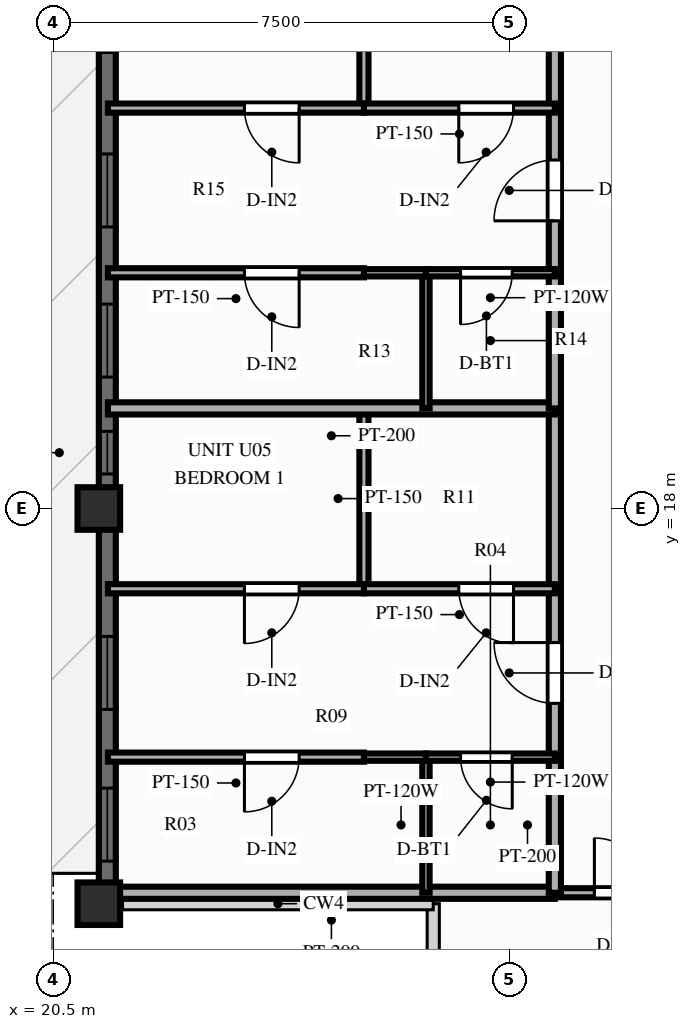
"""IFC4 building model, lengths in metres.
Left out: names, types, materials, properties, quantities, classifications, styles, units other than length and angle.
Written with IfcOpenShell. Run it as: python <this file> out.ifc"""

import sys

from ifc_helpers import new_model, si_unit, direction, frame, frame_2d, origin, origin_2d, place, context, subcontext, project, spatial, rectangle, extrude, source, transform, mapped, element, fill, save


model = new_model("IFC4")
c1 = context("Model", 3, precision=1e-05, world=origin(), true_north=direction((0.0, 1.0)))
c2 = subcontext(c1, "Body", "Model", "MODEL_VIEW")
j1 = project(units=[si_unit("LENGTHUNIT", "METRE"), si_unit("PLANEANGLEUNIT", "RADIAN")], contexts=[c1])
p1 = place(None, origin())
s1 = spatial("IfcSite", under=j1, at=p1, CompositionType="ELEMENT")
p2 = place(p1, origin())
s2 = spatial("IfcBuilding", under=s1, at=p2, CompositionType="ELEMENT")
p3 = place(p2, frame((0.0, 0.0, 236.1)))
s3 = spatial("IfcBuildingStorey", under=s2, at=p3, CompositionType="ELEMENT", Elevation=236.1)
m1 = source(origin(), c2, "Body", "SweptSolid", [
    extrude(rectangle(XDim=0.7, YDim=0.7, at=origin_2d()), origin(), (0.0, 0.0, 1.0), 3.9),
])
for number, where, z_axis, x_axis in (
    (1, (21.25, 18.0, 0.0), (0.0, 0.0, 1.0), (1.0, 0.0, 0.0)),
    (2, (21.25, 11.5, 0.0), (0.0, 0.0, 1.0), (1.0, 0.0, 0.0)),
):
    element("IfcColumn", number, at=place(p3, frame(where, z_axis=z_axis, x_axis=x_axis)), inside=s3, PredefinedType="COLUMN", context=c2, shape_type="MappedRepresentation", body=[
        mapped(m1, transform((0.0, 0.0, 0.0), scale=1.0)),
    ])
p4 = place(p3, frame((21.39, 11.5, 0.0), z_axis=(0.0, 0.0, 1.0), x_axis=(0.0, 1.0, 0.0)))
e3 = element("IfcWall", 3, at=p4, inside=s3, PredefinedType="SOLIDWALL", context=c2, shape_type="SweptSolid", body=[
    extrude(rectangle(XDim=31.0, YDim=0.28, at=frame_2d((15.5, 0.0))), origin(), (0.0, 0.0, 1.0), 2.44),
])
p5 = place(p4, frame((0.7, 0.0, 0.25)))
e4 = element("IfcOpeningElement", 4, at=p5, cuts=e3, PredefinedType="OPENING", context=c2, shape_type="SweptSolid", body=[
    extrude(rectangle(XDim=1.2, YDim=1.5, at=frame_2d((0.6, 0.75))), frame((0.0, 0.152, 0.0), z_axis=(0.0, -1.0, 0.0), x_axis=(1.0, 0.0, 0.0)), (0.0, 0.0, 1.0), 0.304),
])
p6 = place(p4, frame((3.195, 0.0, 0.25)))
e5 = element("IfcOpeningElement", 5, at=p6, cuts=e3, PredefinedType="OPENING", context=c2, shape_type="SweptSolid", body=[
    extrude(rectangle(XDim=1.2, YDim=1.5, at=frame_2d((0.6, 0.75))), frame((0.0, 0.152, 0.0), z_axis=(0.0, -1.0, 0.0), x_axis=(1.0, 0.0, 0.0)), (0.0, 0.0, 1.0), 0.304),
])
p7 = place(p4, frame((7.068, 0.0, 0.25)))
e6 = element("IfcOpeningElement", 6, at=p7, cuts=e3, PredefinedType="OPENING", context=c2, shape_type="SweptSolid", body=[
    extrude(rectangle(XDim=0.7, YDim=1.5, at=frame_2d((0.35, 0.75))), frame((0.0, 0.152, 0.0), z_axis=(0.0, -1.0, 0.0), x_axis=(1.0, 0.0, 0.0)), (0.0, 0.0, 1.0), 0.304),
])
p8 = place(p4, frame((8.662, 0.0, 0.25)))
e7 = element("IfcOpeningElement", 7, at=p8, cuts=e3, PredefinedType="OPENING", context=c2, shape_type="SweptSolid", body=[
    extrude(rectangle(XDim=1.2, YDim=1.5, at=frame_2d((0.6, 0.75))), frame((0.0, 0.152, 0.0), z_axis=(0.0, -1.0, 0.0), x_axis=(1.0, 0.0, 0.0)), (0.0, 0.0, 1.0), 0.304),
])
p9 = place(p4, frame((11.131, 0.0, 0.25)))
e8 = element("IfcOpeningElement", 8, at=p9, cuts=e3, PredefinedType="OPENING", context=c2, shape_type="SweptSolid", body=[
    extrude(rectangle(XDim=1.2, YDim=1.5, at=frame_2d((0.6, 0.75))), frame((0.0, 0.152, 0.0), z_axis=(0.0, -1.0, 0.0), x_axis=(1.0, 0.0, 0.0)), (0.0, 0.0, 1.0), 0.304),
])
p10 = place(p4, frame((13.999, 0.0, 0.25)))
e9 = element("IfcOpeningElement", 9, at=p10, cuts=e3, PredefinedType="OPENING", context=c2, shape_type="SweptSolid", body=[
    extrude(rectangle(XDim=1.2, YDim=1.5, at=frame_2d((0.6, 0.75))), frame((0.0, 0.152, 0.0), z_axis=(0.0, -1.0, 0.0), x_axis=(1.0, 0.0, 0.0)), (0.0, 0.0, 1.0), 0.304),
])
p11 = place(p4, frame((17.565, 0.0, 0.0)))
e10 = element("IfcOpeningElement", 10, at=p11, cuts=e3, PredefinedType="OPENING", context=c2, shape_type="SweptSolid", body=[
    extrude(rectangle(XDim=1.6, YDim=2.15, at=frame_2d((0.8, 1.075))), frame((0.0, 0.152, 0.0), z_axis=(0.0, -1.0, 0.0), x_axis=(1.0, 0.0, 0.0)), (0.0, 0.0, 1.0), 0.304),
])
p12 = place(p4, frame((21.441, 0.0, 0.25)))
e11 = element("IfcOpeningElement", 11, at=p12, cuts=e3, PredefinedType="OPENING", context=c2, shape_type="SweptSolid", body=[
    extrude(rectangle(XDim=1.2, YDim=1.5, at=frame_2d((0.6, 0.75))), frame((0.0, 0.152, 0.0), z_axis=(0.0, -1.0, 0.0), x_axis=(1.0, 0.0, 0.0)), (0.0, 0.0, 1.0), 0.304),
])
p13 = place(p4, frame((26.323, 0.0, 0.25)))
e12 = element("IfcOpeningElement", 12, at=p13, cuts=e3, PredefinedType="OPENING", context=c2, shape_type="SweptSolid", body=[
    extrude(rectangle(XDim=1.2, YDim=1.5, at=frame_2d((0.6, 0.75))), frame((0.0, 0.152, 0.0), z_axis=(0.0, -1.0, 0.0), x_axis=(1.0, 0.0, 0.0)), (0.0, 0.0, 1.0), 0.304),
])
p14 = place(p4, frame((28.818, 0.0, 0.25)))
e13 = element("IfcOpeningElement", 13, at=p14, cuts=e3, PredefinedType="OPENING", context=c2, shape_type="SweptSolid", body=[
    extrude(rectangle(XDim=1.2, YDim=1.5, at=frame_2d((0.6, 0.75))), frame((0.0, 0.152, 0.0), z_axis=(0.0, -1.0, 0.0), x_axis=(1.0, 0.0, 0.0)), (0.0, 0.0, 1.0), 0.304),
])
p15 = place(p3, frame((28.85, 11.68, 0.0), z_axis=(0.0, 0.0, 1.0), x_axis=(1.0, 0.0, 0.0)))
e14 = element("IfcWall", 14, at=p15, inside=s3, PredefinedType="PARTITIONING", context=c2, shape_type="SweptSolid", body=[
    extrude(rectangle(XDim=2.33, YDim=0.15, at=frame_2d((1.165, 0.0))), origin(), (0.0, 0.0, 1.0), 2.24),
])
p16 = place(p15, frame((0.55, 0.0, 0.0)))
e15 = element("IfcOpeningElement", 15, at=p16, cuts=e14, PredefinedType="OPENING", context=c2, shape_type="SweptSolid", body=[
    extrude(rectangle(XDim=0.9, YDim=2.1, at=frame_2d((0.45, 1.05))), frame((0.0, 0.087, 0.0), z_axis=(0.0, -1.0, 0.0), x_axis=(1.0, 0.0, 0.0)), (0.0, 0.0, 1.0), 0.174),
])
p17 = place(p3, frame((28.75, 11.68, 0.0), z_axis=(0.0, 0.0, 1.0), x_axis=(-1.0, 0.0, 0.0)))
e16 = element("IfcWall", 16, at=p17, inside=s3, PredefinedType="PARTITIONING", context=c2, shape_type="SweptSolid", body=[
    extrude(rectangle(XDim=7.35, YDim=0.2, at=frame_2d((3.675, 0.0))), origin(), (0.0, 0.0, 1.0), 2.24),
])
p18 = place(p3, frame((28.75, 11.68, 0.0), z_axis=(0.0, 0.0, 1.0), x_axis=(0.0, 1.0, 0.0)))
e17 = element("IfcWall", 17, at=p18, inside=s3, PredefinedType="PARTITIONING", context=c2, shape_type="SweptSolid", body=[
    extrude(rectangle(XDim=2.231, YDim=0.2, at=frame_2d((1.115, 0.0))), origin(), (0.0, 0.0, 1.0), 2.24),
])
p19 = place(p3, frame((28.75, 13.911, 0.0), z_axis=(0.0, 0.0, 1.0), x_axis=(0.0, 1.0, 0.0)))
e18 = element("IfcWall", 18, at=p19, inside=s3, PredefinedType="PARTITIONING", context=c2, shape_type="SweptSolid", body=[
    extrude(rectangle(XDim=2.769, YDim=0.2, at=frame_2d((1.385, 0.0))), origin(), (0.0, 0.0, 1.0), 2.24),
])
p20 = place(p19, frame((0.885, 0.0, 0.0)))
e19 = element("IfcOpeningElement", 19, at=p20, cuts=e18, PredefinedType="OPENING", context=c2, shape_type="SweptSolid", body=[
    extrude(rectangle(XDim=1.0, YDim=2.15, at=frame_2d((0.5, 1.075))), frame((0.0, 0.112, 0.0), z_axis=(0.0, -1.0, 0.0), x_axis=(1.0, 0.0, 0.0)), (0.0, 0.0, 1.0), 0.224),
])
p21 = place(p3, frame((28.75, 16.68, 0.0), z_axis=(0.0, 0.0, 1.0), x_axis=(0.0, 1.0, 0.0)))
e20 = element("IfcWall", 20, at=p21, inside=s3, PredefinedType="PARTITIONING", context=c2, shape_type="SweptSolid", body=[
    extrude(rectangle(XDim=2.967, YDim=0.2, at=frame_2d((1.483, 0.0))), origin(), (0.0, 0.0, 1.0), 2.24),
])
p22 = place(p3, frame((26.63, 11.68, 0.0), z_axis=(0.0, 0.0, 1.0), x_axis=(0.0, 1.0, 0.0)))
e21 = element("IfcWall", 21, at=p22, inside=s3, PredefinedType="PARTITIONING", context=c2, shape_type="SweptSolid", body=[
    extrude(rectangle(XDim=2.231, YDim=0.12, at=frame_2d((1.115, 0.0))), origin(), (0.0, 0.0, 1.0), 3.56),
])
p23 = place(p3, frame((25.61, 16.68, 0.0), z_axis=(0.0, 0.0, 1.0), x_axis=(0.0, 1.0, 0.0)))
e22 = element("IfcWall", 22, at=p23, inside=s3, PredefinedType="PARTITIONING", context=c2, shape_type="SweptSolid", body=[
    extrude(rectangle(XDim=2.967, YDim=0.15, at=frame_2d((1.483, 0.0))), origin(), (0.0, 0.0, 1.0), 3.39),
])
p24 = place(p3, frame((28.75, 13.911, 0.0), z_axis=(0.0, 0.0, 1.0), x_axis=(-1.0, 0.0, 0.0)))
e23 = element("IfcWall", 23, at=p24, inside=s3, PredefinedType="PARTITIONING", context=c2, shape_type="SweptSolid", body=[
    extrude(rectangle(XDim=2.12, YDim=0.12, at=frame_2d((1.06, 0.0))), origin(), (0.0, 0.0, 1.0), 3.56),
])
p25 = place(p24, frame((0.701, 0.0, 0.0)))
e24 = element("IfcOpeningElement", 24, at=p25, cuts=e23, PredefinedType="OPENING", context=c2, shape_type="SweptSolid", body=[
    extrude(rectangle(XDim=0.85, YDim=2.05, at=frame_2d((0.425, 1.025))), frame((0.0, 0.072, 0.0), z_axis=(0.0, -1.0, 0.0), x_axis=(1.0, 0.0, 0.0)), (0.0, 0.0, 1.0), 0.144),
])
p26 = place(p3, frame((26.63, 13.911, 0.0), z_axis=(0.0, 0.0, 1.0), x_axis=(-1.0, 0.0, 0.0)))
e25 = element("IfcWall", 25, at=p26, inside=s3, PredefinedType="PARTITIONING", context=c2, shape_type="SweptSolid", body=[
    extrude(rectangle(XDim=1.02, YDim=0.12, at=frame_2d((0.51, 0.0))), origin(), (0.0, 0.0, 1.0), 3.56),
])
p27 = place(p3, frame((25.61, 13.911, 0.0), z_axis=(0.0, 0.0, 1.0), x_axis=(-1.0, 0.0, 0.0)))
e26 = element("IfcWall", 26, at=p27, inside=s3, PredefinedType="PARTITIONING", context=c2, shape_type="SweptSolid", body=[
    extrude(rectangle(XDim=4.21, YDim=0.15, at=frame_2d((2.105, 0.0))), origin(), (0.0, 0.0, 1.0), 3.56),
])
p28 = place(p27, frame((1.065, 0.0, 0.0)))
e27 = element("IfcOpeningElement", 27, at=p28, cuts=e26, PredefinedType="OPENING", context=c2, shape_type="SweptSolid", body=[
    extrude(rectangle(XDim=0.9, YDim=2.1, at=frame_2d((0.45, 1.05))), frame((0.0, 0.087, 0.0), z_axis=(0.0, -1.0, 0.0), x_axis=(1.0, 0.0, 0.0)), (0.0, 0.0, 1.0), 0.174),
])
p29 = place(p3, frame((28.75, 16.68, 0.0), z_axis=(0.0, 0.0, 1.0), x_axis=(-1.0, 0.0, 0.0)))
e28 = element("IfcWall", 28, at=p29, inside=s3, PredefinedType="PARTITIONING", context=c2, shape_type="SweptSolid", body=[
    extrude(rectangle(XDim=3.14, YDim=0.15, at=frame_2d((1.57, 0.0))), origin(), (0.0, 0.0, 1.0), 3.56),
])
p30 = place(p29, frame((0.68, 0.0, 0.0)))
e29 = element("IfcOpeningElement", 29, at=p30, cuts=e28, PredefinedType="OPENING", context=c2, shape_type="SweptSolid", body=[
    extrude(rectangle(XDim=0.9, YDim=2.1, at=frame_2d((0.45, 1.05))), frame((0.0, 0.087, 0.0), z_axis=(0.0, -1.0, 0.0), x_axis=(1.0, 0.0, 0.0)), (0.0, 0.0, 1.0), 0.174),
])
p31 = place(p3, frame((25.61, 16.68, 0.0), z_axis=(0.0, 0.0, 1.0), x_axis=(-1.0, 0.0, 0.0)))
e30 = element("IfcWall", 30, at=p31, inside=s3, PredefinedType="PARTITIONING", context=c2, shape_type="SweptSolid", body=[
    extrude(rectangle(XDim=4.21, YDim=0.15, at=frame_2d((2.105, 0.0))), origin(), (0.0, 0.0, 1.0), 3.56),
])
p32 = place(p31, frame((1.065, 0.0, 0.0)))
e31 = element("IfcOpeningElement", 31, at=p32, cuts=e30, PredefinedType="OPENING", context=c2, shape_type="SweptSolid", body=[
    extrude(rectangle(XDim=0.9, YDim=2.1, at=frame_2d((0.45, 1.05))), frame((0.0, 0.087, 0.0), z_axis=(0.0, -1.0, 0.0), x_axis=(1.0, 0.0, 0.0)), (0.0, 0.0, 1.0), 0.174),
])
p33 = place(p3, frame((28.75, 19.646, 0.0), z_axis=(0.0, 0.0, 1.0), x_axis=(-1.0, 0.0, 0.0)))
e32 = element("IfcWall", 32, at=p33, inside=s3, PredefinedType="PARTITIONING", context=c2, shape_type="SweptSolid", body=[
    extrude(rectangle(XDim=7.35, YDim=0.2, at=frame_2d((3.675, 0.0))), origin(), (0.0, 0.0, 1.0), 3.56),
])
p34 = place(p3, frame((28.75, 19.646, 0.0), z_axis=(0.0, 0.0, 1.0), x_axis=(0.0, 1.0, 0.0)))
e33 = element("IfcWall", 33, at=p34, inside=s3, PredefinedType="PARTITIONING", context=c2, shape_type="SweptSolid", body=[
    extrude(rectangle(XDim=2.23, YDim=0.2, at=frame_2d((1.115, 0.0))), origin(), (0.0, 0.0, 1.0), 3.56),
])
p35 = place(p3, frame((28.75, 21.877, 0.0), z_axis=(0.0, 0.0, 1.0), x_axis=(0.0, 1.0, 0.0)))
e34 = element("IfcWall", 34, at=p35, inside=s3, PredefinedType="PARTITIONING", context=c2, shape_type="SweptSolid", body=[
    extrude(rectangle(XDim=2.709, YDim=0.2, at=frame_2d((1.354, 0.0))), origin(), (0.0, 0.0, 1.0), 3.56),
])
p36 = place(p35, frame((0.854, 0.0, 0.0)))
e35 = element("IfcOpeningElement", 35, at=p36, cuts=e34, PredefinedType="OPENING", context=c2, shape_type="SweptSolid", body=[
    extrude(rectangle(XDim=1.0, YDim=2.15, at=frame_2d((0.5, 1.075))), frame((0.0, 0.112, 0.0), z_axis=(0.0, -1.0, 0.0), x_axis=(1.0, 0.0, 0.0)), (0.0, 0.0, 1.0), 0.224),
])
p37 = place(p3, frame((28.75, 24.586, 0.0), z_axis=(0.0, 0.0, 1.0), x_axis=(0.0, 1.0, 0.0)))
e36 = element("IfcWall", 36, at=p37, inside=s3, PredefinedType="PARTITIONING", context=c2, shape_type="SweptSolid", body=[
    extrude(rectangle(XDim=3.027, YDim=0.2, at=frame_2d((1.514, 0.0))), origin(), (0.0, 0.0, 1.0), 3.56),
])
p38 = place(p3, frame((26.63, 19.646, 0.0), z_axis=(0.0, 0.0, 1.0), x_axis=(0.0, 1.0, 0.0)))
e37 = element("IfcWall", 37, at=p38, inside=s3, PredefinedType="PARTITIONING", context=c2, shape_type="SweptSolid", body=[
    extrude(rectangle(XDim=2.23, YDim=0.12, at=frame_2d((1.115, 0.0))), origin(), (0.0, 0.0, 1.0), 3.39),
])
p39 = place(p3, frame((25.61, 24.586, 0.0), z_axis=(0.0, 0.0, 1.0), x_axis=(0.0, 1.0, 0.0)))
e38 = element("IfcWall", 38, at=p39, inside=s3, PredefinedType="PARTITIONING", context=c2, shape_type="SweptSolid", body=[
    extrude(rectangle(XDim=3.027, YDim=0.15, at=frame_2d((1.514, 0.0))), origin(), (0.0, 0.0, 1.0), 3.39),
])
p40 = place(p3, frame((28.75, 21.877, 0.0), z_axis=(0.0, 0.0, 1.0), x_axis=(-1.0, 0.0, 0.0)))
e39 = element("IfcWall", 39, at=p40, inside=s3, PredefinedType="PARTITIONING", context=c2, shape_type="SweptSolid", body=[
    extrude(rectangle(XDim=2.12, YDim=0.12, at=frame_2d((1.06, 0.0))), origin(), (0.0, 0.0, 1.0), 3.29),
])
p41 = place(p40, frame((0.701, 0.0, 0.0)))
e40 = element("IfcOpeningElement", 40, at=p41, cuts=e39, PredefinedType="OPENING", context=c2, shape_type="SweptSolid", body=[
    extrude(rectangle(XDim=0.85, YDim=2.05, at=frame_2d((0.425, 1.025))), frame((0.0, 0.072, 0.0), z_axis=(0.0, -1.0, 0.0), x_axis=(1.0, 0.0, 0.0)), (0.0, 0.0, 1.0), 0.144),
])
p42 = place(p3, frame((26.63, 21.877, 0.0), z_axis=(0.0, 0.0, 1.0), x_axis=(-1.0, 0.0, 0.0)))
e41 = element("IfcWall", 41, at=p42, inside=s3, PredefinedType="PARTITIONING", context=c2, shape_type="SweptSolid", body=[
    extrude(rectangle(XDim=1.02, YDim=0.12, at=frame_2d((0.51, 0.0))), origin(), (0.0, 0.0, 1.0), 3.29),
])
p43 = place(p3, frame((25.61, 21.877, 0.0), z_axis=(0.0, 0.0, 1.0), x_axis=(-1.0, 0.0, 0.0)))
e42 = element("IfcWall", 42, at=p43, inside=s3, PredefinedType="PARTITIONING", context=c2, shape_type="SweptSolid", body=[
    extrude(rectangle(XDim=4.21, YDim=0.15, at=frame_2d((2.105, 0.0))), origin(), (0.0, 0.0, 1.0), 3.29),
])
p44 = place(p43, frame((1.065, 0.0, 0.0)))
e43 = element("IfcOpeningElement", 43, at=p44, cuts=e42, PredefinedType="OPENING", context=c2, shape_type="SweptSolid", body=[
    extrude(rectangle(XDim=0.9, YDim=2.1, at=frame_2d((0.45, 1.05))), frame((0.0, 0.087, 0.0), z_axis=(0.0, -1.0, 0.0), x_axis=(1.0, 0.0, 0.0)), (0.0, 0.0, 1.0), 0.174),
])
p45 = place(p3, frame((28.75, 24.586, 0.0), z_axis=(0.0, 0.0, 1.0), x_axis=(-1.0, 0.0, 0.0)))
e44 = element("IfcWall", 44, at=p45, inside=s3, PredefinedType="PARTITIONING", context=c2, shape_type="SweptSolid", body=[
    extrude(rectangle(XDim=3.14, YDim=0.15, at=frame_2d((1.57, 0.0))), origin(), (0.0, 0.0, 1.0), 3.56),
])
p46 = place(p45, frame((0.68, 0.0, 0.0)))
e45 = element("IfcOpeningElement", 45, at=p46, cuts=e44, PredefinedType="OPENING", context=c2, shape_type="SweptSolid", body=[
    extrude(rectangle(XDim=0.9, YDim=2.1, at=frame_2d((0.45, 1.05))), frame((0.0, 0.087, 0.0), z_axis=(0.0, -1.0, 0.0), x_axis=(1.0, 0.0, 0.0)), (0.0, 0.0, 1.0), 0.174),
])
p47 = place(p3, frame((25.61, 24.586, 0.0), z_axis=(0.0, 0.0, 1.0), x_axis=(-1.0, 0.0, 0.0)))
e46 = element("IfcWall", 46, at=p47, inside=s3, PredefinedType="PARTITIONING", context=c2, shape_type="SweptSolid", body=[
    extrude(rectangle(XDim=4.21, YDim=0.15, at=frame_2d((2.105, 0.0))), origin(), (0.0, 0.0, 1.0), 3.56),
])
p48 = place(p47, frame((1.065, 0.0, 0.0)))
e47 = element("IfcOpeningElement", 47, at=p48, cuts=e46, PredefinedType="OPENING", context=c2, shape_type="SweptSolid", body=[
    extrude(rectangle(XDim=0.9, YDim=2.1, at=frame_2d((0.45, 1.05))), frame((0.0, 0.087, 0.0), z_axis=(0.0, -1.0, 0.0), x_axis=(1.0, 0.0, 0.0)), (0.0, 0.0, 1.0), 0.174),
])
m2 = source(origin(), c2, "Body", "SweptSolid", [
    extrude(rectangle(XDim=1.2, YDim=1.5, at=frame_2d((0.6, 0.75))), frame((0.0, 0.03, 0.0), z_axis=(0.0, -1.0, 0.0), x_axis=(1.0, 0.0, 0.0)), (0.0, 0.0, 1.0), 0.06),
])
p49 = place(p5, origin())
e48 = element("IfcWindow", 48, at=p49, inside=s3, PartitioningType="SINGLE_PANEL", PredefinedType="WINDOW", context=c2, shape_type="MappedRepresentation", body=[
    mapped(m2, transform((0.0, 0.0, 0.0), scale=1.0)),
])
fill(e4, e48)
p50 = place(p6, origin())
e49 = element("IfcWindow", 49, at=p50, inside=s3, PartitioningType="SINGLE_PANEL", PredefinedType="WINDOW", context=c2, shape_type="MappedRepresentation", body=[
    mapped(m2, transform((0.0, 0.0, 0.0), scale=1.0)),
])
fill(e5, e49)
m3 = source(origin(), c2, "Body", "SweptSolid", [
    extrude(rectangle(XDim=0.7, YDim=1.5, at=frame_2d((0.35, 0.75))), frame((0.0, 0.03, 0.0), z_axis=(0.0, -1.0, 0.0), x_axis=(1.0, 0.0, 0.0)), (0.0, 0.0, 1.0), 0.06),
])
p51 = place(p7, origin())
e50 = element("IfcWindow", 50, at=p51, inside=s3, PartitioningType="SINGLE_PANEL", PredefinedType="WINDOW", context=c2, shape_type="MappedRepresentation", body=[
    mapped(m3, transform((0.0, 0.0, 0.0), scale=1.0)),
])
fill(e6, e50)
p52 = place(p8, origin())
e51 = element("IfcWindow", 51, at=p52, inside=s3, PartitioningType="SINGLE_PANEL", PredefinedType="WINDOW", context=c2, shape_type="MappedRepresentation", body=[
    mapped(m2, transform((0.0, 0.0, 0.0), scale=1.0)),
])
fill(e7, e51)
p53 = place(p9, origin())
e52 = element("IfcWindow", 52, at=p53, inside=s3, PartitioningType="SINGLE_PANEL", PredefinedType="WINDOW", context=c2, shape_type="MappedRepresentation", body=[
    mapped(m2, transform((0.0, 0.0, 0.0), scale=1.0)),
])
fill(e8, e52)
p54 = place(p10, origin())
e53 = element("IfcWindow", 53, at=p54, inside=s3, PartitioningType="SINGLE_PANEL", PredefinedType="WINDOW", context=c2, shape_type="MappedRepresentation", body=[
    mapped(m2, transform((0.0, 0.0, 0.0), scale=1.0)),
])
fill(e9, e53)
m4 = source(origin(), c2, "Body", "SweptSolid", [
    extrude(rectangle(XDim=0.9, YDim=2.1, at=frame_2d((0.45, 1.05))), frame((0.0, 0.025, 0.0), z_axis=(0.0, -1.0, 0.0), x_axis=(1.0, 0.0, 0.0)), (0.0, 0.0, 1.0), 0.05),
])
p55 = place(p16, origin())
e54 = element("IfcDoor", 54, at=p55, inside=s3, OperationType="SINGLE_SWING_LEFT", PredefinedType="DOOR", context=c2, shape_type="MappedRepresentation", body=[
    mapped(m4, transform((0.0, 0.0, 0.0), scale=1.0)),
])
fill(e15, e54)
m5 = source(origin(), c2, "Body", "SweptSolid", [
    extrude(rectangle(XDim=1.0, YDim=2.15, at=frame_2d((0.5, 1.075))), frame((0.0, 0.025, 0.0), z_axis=(0.0, -1.0, 0.0), x_axis=(1.0, 0.0, 0.0)), (0.0, 0.0, 1.0), 0.05),
])
p56 = place(p20, origin())
e55 = element("IfcDoor", 55, at=p56, inside=s3, OperationType="SINGLE_SWING_RIGHT", PredefinedType="DOOR", context=c2, shape_type="MappedRepresentation", body=[
    mapped(m5, transform((0.0, 0.0, 0.0), scale=1.0)),
])
fill(e19, e55)
m6 = source(origin(), c2, "Body", "SweptSolid", [
    extrude(rectangle(XDim=0.85, YDim=2.05, at=frame_2d((0.425, 1.025))), frame((0.0, 0.025, 0.0), z_axis=(0.0, -1.0, 0.0), x_axis=(1.0, 0.0, 0.0)), (0.0, 0.0, 1.0), 0.05),
])
p57 = place(p25, origin())
e56 = element("IfcDoor", 56, at=p57, inside=s3, OperationType="SINGLE_SWING_LEFT", PredefinedType="DOOR", context=c2, shape_type="MappedRepresentation", body=[
    mapped(m6, transform((0.0, 0.0, 0.0), scale=1.0)),
])
fill(e24, e56)
p58 = place(p28, origin())
e57 = element("IfcDoor", 57, at=p58, inside=s3, OperationType="SINGLE_SWING_RIGHT", PredefinedType="DOOR", context=c2, shape_type="MappedRepresentation", body=[
    mapped(m4, transform((0.0, 0.0, 0.0), scale=1.0)),
])
fill(e27, e57)
p59 = place(p30, origin())
e58 = element("IfcDoor", 58, at=p59, inside=s3, OperationType="SINGLE_SWING_LEFT", PredefinedType="DOOR", context=c2, shape_type="MappedRepresentation", body=[
    mapped(m4, transform((0.0, 0.0, 0.0), scale=1.0)),
])
fill(e29, e58)
p60 = place(p32, origin())
e59 = element("IfcDoor", 59, at=p60, inside=s3, OperationType="SINGLE_SWING_RIGHT", PredefinedType="DOOR", context=c2, shape_type="MappedRepresentation", body=[
    mapped(m4, transform((0.0, 0.0, 0.0), scale=1.0)),
])
fill(e31, e59)
p61 = place(p36, origin())
e60 = element("IfcDoor", 60, at=p61, inside=s3, OperationType="SINGLE_SWING_LEFT", PredefinedType="DOOR", context=c2, shape_type="MappedRepresentation", body=[
    mapped(m5, transform((0.0, 0.0, 0.0), scale=1.0)),
])
fill(e35, e60)
p62 = place(p41, origin())
e61 = element("IfcDoor", 61, at=p62, inside=s3, OperationType="SINGLE_SWING_RIGHT", PredefinedType="DOOR", context=c2, shape_type="MappedRepresentation", body=[
    mapped(m6, transform((0.0, 0.0, 0.0), scale=1.0)),
])
fill(e40, e61)
p63 = place(p44, origin())
e62 = element("IfcDoor", 62, at=p63, inside=s3, OperationType="SINGLE_SWING_LEFT", PredefinedType="DOOR", context=c2, shape_type="MappedRepresentation", body=[
    mapped(m4, transform((0.0, 0.0, 0.0), scale=1.0)),
])
fill(e43, e62)
p64 = place(p46, origin())
e63 = element("IfcDoor", 63, at=p64, inside=s3, OperationType="SINGLE_SWING_RIGHT", PredefinedType="DOOR", context=c2, shape_type="MappedRepresentation", body=[
    mapped(m4, transform((0.0, 0.0, 0.0), scale=1.0)),
])
fill(e45, e63)
p65 = place(p48, origin())
e64 = element("IfcDoor", 64, at=p65, inside=s3, OperationType="SINGLE_SWING_LEFT", PredefinedType="DOOR", context=c2, shape_type="MappedRepresentation", body=[
    mapped(m4, transform((0.0, 0.0, 0.0), scale=1.0)),
])
fill(e47, e64)
save(model, sys.argv[1])
